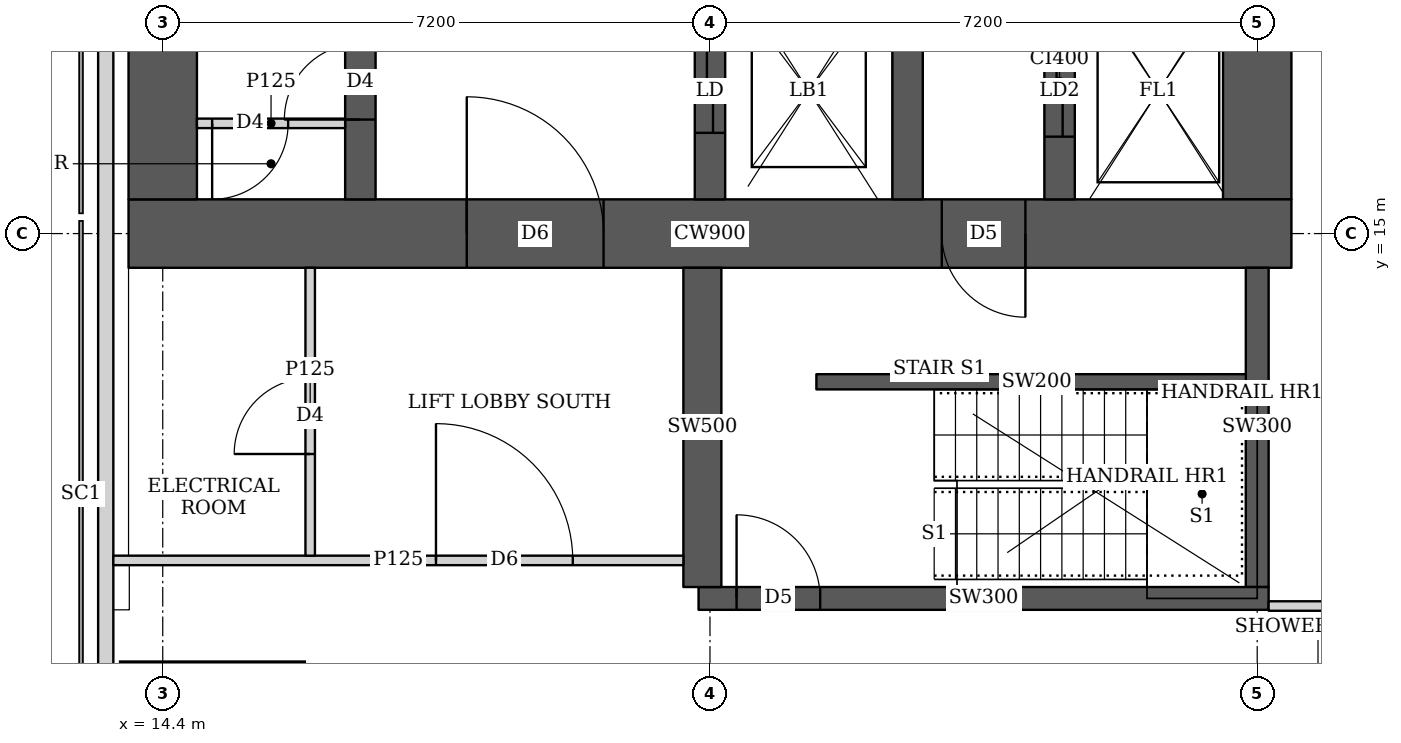
"""IFC4 building model, lengths in metres.
Left out: names, types, materials, properties, quantities, classifications, styles, units other than length and angle.
Written with IfcOpenShell. Run it as: python <this file> out.ifc"""

import sys

from ifc_helpers import new_model, si_unit, direction, frame, frame_2d, origin, origin_2d, place, context, subcontext, project, spatial, rectangle, extrude, element, fill, save


model = new_model("IFC4")
c1 = context("Model", 3, precision=1e-05, world=origin(), true_north=direction((0.0, 1.0)))
c2 = subcontext(c1, "Body", "Model", "MODEL_VIEW")
j1 = project(units=[si_unit("LENGTHUNIT", "METRE"), si_unit("PLANEANGLEUNIT", "RADIAN")], contexts=[c1])
p1 = place(None, origin())
s1 = spatial("IfcSite", under=j1, at=p1, CompositionType="ELEMENT")
p2 = place(p1, origin())
s2 = spatial("IfcBuilding", under=s1, at=p2, CompositionType="ELEMENT")
p3 = place(p2, frame((0.0, 0.0, 242.45)))
s3 = spatial("IfcBuildingStorey", under=s2, at=p3, CompositionType="ELEMENT", Elevation=242.45)
p4 = place(p3, frame((15.054, 8.154, 0.0), z_axis=(0.0, 0.0, 1.0), x_axis=(1.0, 0.0, 0.0)))
e1 = element("IfcColumn", 1, at=p4, inside=s3, PredefinedType="COLUMN", context=c2, shape_type="SweptSolid", body=[
    extrude(rectangle(XDim=2.4, YDim=2.4, at=origin_2d()), origin(), (0.0, 0.0, 1.0), 3.75),
])
p5 = place(p3, frame((13.95, 15.0, 0.0), z_axis=(0.0, 0.0, 1.0), x_axis=(1.0, 0.0, 0.0)))
e2 = element("IfcWall", 2, at=p5, inside=s3, PredefinedType="SHEAR", context=c2, shape_type="SweptSolid", body=[
    extrude(rectangle(XDim=15.3, YDim=0.9, at=frame_2d((7.65, 0.0))), origin(), (0.0, 0.0, 1.0), 3.75),
])
p6 = place(p5, frame((4.45, 0.0, 0.0)))
e3 = element("IfcOpeningElement", 3, at=p6, cuts=e2, PredefinedType="OPENING", context=c2, shape_type="SweptSolid", body=[
    extrude(rectangle(XDim=1.8, YDim=2.1, at=frame_2d((0.9, 1.05))), frame((0.0, 0.46, 0.0), z_axis=(0.0, -1.0, 0.0), x_axis=(1.0, 0.0, 0.0)), (0.0, 0.0, 1.0), 0.92),
])
p7 = place(p5, frame((10.7, 0.0, 0.0)))
e4 = element("IfcOpeningElement", 4, at=p7, cuts=e2, PredefinedType="OPENING", context=c2, shape_type="SweptSolid", body=[
    extrude(rectangle(XDim=1.1, YDim=2.1, at=frame_2d((0.55, 1.05))), frame((0.0, 0.46, 0.0), z_axis=(0.0, -1.0, 0.0), x_axis=(1.0, 0.0, 0.0)), (0.0, 0.0, 1.0), 0.92),
])
for number, where, z_axis, x_axis in (
    (5, (14.4, 15.45, 0.0), (0.0, 0.0, 1.0), (0.0, 1.0, 0.0)),
    (6, (28.8, 15.45, 0.0), (0.0, 0.0, 1.0), (0.0, 1.0, 0.0)),
):
    element("IfcWall", number, at=place(p3, frame(where, z_axis=z_axis, x_axis=x_axis)), inside=s3, PredefinedType="SHEAR", context=c2, shape_type="SweptSolid", body=[
        extrude(rectangle(XDim=14.1, YDim=0.9, at=frame_2d((7.05, 0.0))), origin(), (0.0, 0.0, 1.0), 3.75),
    ])
p8 = place(p3, frame((17.0, 15.45, 0.0), z_axis=(0.0, 0.0, 1.0), x_axis=(0.0, 1.0, 0.0)))
e7 = element("IfcWall", 7, at=p8, inside=s3, PredefinedType="SHEAR", context=c2, shape_type="SweptSolid", body=[
    extrude(rectangle(XDim=14.1, YDim=0.4, at=frame_2d((7.05, 0.0))), origin(), (0.0, 0.0, 1.0), 3.75),
])
p9 = place(p8, frame((1.05, 0.0, 0.0)))
e8 = element("IfcOpeningElement", 8, at=p9, cuts=e7, PredefinedType="OPENING", context=c2, shape_type="SweptSolid", body=[
    extrude(rectangle(XDim=1.0, YDim=2.1, at=frame_2d((0.5, 1.05))), frame((0.0, 0.21, 0.0), z_axis=(0.0, -1.0, 0.0), x_axis=(1.0, 0.0, 0.0)), (0.0, 0.0, 1.0), 0.42),
])
p10 = place(p8, frame((4.675, 0.0, 0.0)))
e9 = element("IfcOpeningElement", 9, at=p10, cuts=e7, PredefinedType="OPENING", context=c2, shape_type="SweptSolid", body=[
    extrude(rectangle(XDim=1.0, YDim=2.1, at=frame_2d((0.5, 1.05))), frame((0.0, 0.21, 0.0), z_axis=(0.0, -1.0, 0.0), x_axis=(1.0, 0.0, 0.0)), (0.0, 0.0, 1.0), 0.42),
])
p11 = place(p8, frame((8.425, 0.0, 0.0)))
e10 = element("IfcOpeningElement", 10, at=p11, cuts=e7, PredefinedType="OPENING", context=c2, shape_type="SweptSolid", body=[
    extrude(rectangle(XDim=1.0, YDim=2.1, at=frame_2d((0.5, 1.05))), frame((0.0, 0.21, 0.0), z_axis=(0.0, -1.0, 0.0), x_axis=(1.0, 0.0, 0.0)), (0.0, 0.0, 1.0), 0.42),
])
p12 = place(p8, frame((12.175, 0.0, 0.0)))
e11 = element("IfcOpeningElement", 11, at=p12, cuts=e7, PredefinedType="OPENING", context=c2, shape_type="SweptSolid", body=[
    extrude(rectangle(XDim=1.0, YDim=2.1, at=frame_2d((0.5, 1.05))), frame((0.0, 0.21, 0.0), z_axis=(0.0, -1.0, 0.0), x_axis=(1.0, 0.0, 0.0)), (0.0, 0.0, 1.0), 0.42),
])
p13 = place(p3, frame((21.6, 15.45, 0.0), z_axis=(0.0, 0.0, 1.0), x_axis=(0.0, 1.0, 0.0)))
e12 = element("IfcWall", 12, at=p13, inside=s3, PredefinedType="SHEAR", context=c2, shape_type="SweptSolid", body=[
    extrude(rectangle(XDim=14.1, YDim=0.4, at=frame_2d((7.05, 0.0))), origin(), (0.0, 0.0, 1.0), 3.75),
])
p14 = place(p13, frame((0.875, 0.0, 0.0)))
e13 = element("IfcOpeningElement", 13, at=p14, cuts=e12, PredefinedType="OPENING", context=c2, shape_type="SweptSolid", body=[
    extrude(rectangle(XDim=1.1, YDim=2.1, at=frame_2d((0.55, 1.05))), frame((0.0, 0.21, 0.0), z_axis=(0.0, -1.0, 0.0), x_axis=(1.0, 0.0, 0.0)), (0.0, 0.0, 1.0), 0.42),
])
p15 = place(p13, frame((4.625, 0.0, 0.0)))
e14 = element("IfcOpeningElement", 14, at=p15, cuts=e12, PredefinedType="OPENING", context=c2, shape_type="SweptSolid", body=[
    extrude(rectangle(XDim=1.1, YDim=2.1, at=frame_2d((0.55, 1.05))), frame((0.0, 0.21, 0.0), z_axis=(0.0, -1.0, 0.0), x_axis=(1.0, 0.0, 0.0)), (0.0, 0.0, 1.0), 0.42),
])
p16 = place(p13, frame((8.375, 0.0, 0.0)))
e15 = element("IfcOpeningElement", 15, at=p16, cuts=e12, PredefinedType="OPENING", context=c2, shape_type="SweptSolid", body=[
    extrude(rectangle(XDim=1.1, YDim=2.1, at=frame_2d((0.55, 1.05))), frame((0.0, 0.21, 0.0), z_axis=(0.0, -1.0, 0.0), x_axis=(1.0, 0.0, 0.0)), (0.0, 0.0, 1.0), 0.42),
])
p17 = place(p13, frame((12.125, 0.0, 0.0)))
e16 = element("IfcOpeningElement", 16, at=p17, cuts=e12, PredefinedType="OPENING", context=c2, shape_type="SweptSolid", body=[
    extrude(rectangle(XDim=1.1, YDim=2.1, at=frame_2d((0.55, 1.05))), frame((0.0, 0.21, 0.0), z_axis=(0.0, -1.0, 0.0), x_axis=(1.0, 0.0, 0.0)), (0.0, 0.0, 1.0), 0.42),
])
p18 = place(p3, frame((24.2, 15.45, 0.0), z_axis=(0.0, 0.0, 1.0), x_axis=(0.0, 1.0, 0.0)))
e17 = element("IfcWall", 17, at=p18, inside=s3, PredefinedType="SHEAR", context=c2, shape_type="SweptSolid", body=[
    extrude(rectangle(XDim=14.1, YDim=0.4, at=frame_2d((7.05, 0.0))), origin(), (0.0, 0.0, 1.0), 3.75),
])
p19 = place(p3, frame((26.2, 15.45, 0.0), z_axis=(0.0, 0.0, 1.0), x_axis=(0.0, 1.0, 0.0)))
e18 = element("IfcWall", 18, at=p19, inside=s3, PredefinedType="SHEAR", context=c2, shape_type="SweptSolid", body=[
    extrude(rectangle(XDim=3.1, YDim=0.4, at=frame_2d((1.55, 0.0))), origin(), (0.0, 0.0, 1.0), 3.75),
])
p20 = place(p19, frame((0.825, 0.0, 0.0)))
e19 = element("IfcOpeningElement", 19, at=p20, cuts=e18, PredefinedType="OPENING", context=c2, shape_type="SweptSolid", body=[
    extrude(rectangle(XDim=1.2, YDim=2.1, at=frame_2d((0.6, 1.05))), frame((0.0, 0.21, 0.0), z_axis=(0.0, -1.0, 0.0), x_axis=(1.0, 0.0, 0.0)), (0.0, 0.0, 1.0), 0.42),
])
p21 = place(p3, frame((21.45, 10.2, 0.0), z_axis=(0.0, 0.0, 1.0), x_axis=(1.0, 0.0, 0.0)))
e20 = element("IfcWall", 20, at=p21, inside=s3, PredefinedType="SHEAR", context=c2, shape_type="SweptSolid", body=[
    extrude(rectangle(XDim=7.5, YDim=0.3, at=frame_2d((3.75, 0.0))), origin(), (0.0, 0.0, 1.0), 3.75),
])
p22 = place(p21, frame((0.5, 0.0, 0.0)))
e21 = element("IfcOpeningElement", 21, at=p22, cuts=e20, PredefinedType="OPENING", context=c2, shape_type="SweptSolid", body=[
    extrude(rectangle(XDim=1.1, YDim=2.1, at=frame_2d((0.55, 1.05))), frame((0.0, 0.16, 0.0), z_axis=(0.0, -1.0, 0.0), x_axis=(1.0, 0.0, 0.0)), (0.0, 0.0, 1.0), 0.32),
])
p23 = place(p3, frame((21.5, 10.35, 0.0), z_axis=(0.0, 0.0, 1.0), x_axis=(0.0, 1.0, 0.0)))
e22 = element("IfcWall", 22, at=p23, inside=s3, PredefinedType="SHEAR", context=c2, shape_type="SweptSolid", body=[
    extrude(rectangle(XDim=4.2, YDim=0.5, at=frame_2d((2.1, 0.0))), origin(), (0.0, 0.0, 1.0), 3.75),
])
p24 = place(p3, frame((28.8, 10.35, 0.0), z_axis=(0.0, 0.0, 1.0), x_axis=(0.0, 1.0, 0.0)))
e23 = element("IfcWall", 23, at=p24, inside=s3, PredefinedType="SHEAR", context=c2, shape_type="SweptSolid", body=[
    extrude(rectangle(XDim=4.2, YDim=0.3, at=frame_2d((2.1, 0.0))), origin(), (0.0, 0.0, 1.0), 3.75),
])
p25 = place(p3, frame((13.65, 44.837, 0.0), z_axis=(0.0, 0.0, 1.0), x_axis=(0.0, -1.0, 0.0)))
e24 = element("IfcWall", 24, at=p25, inside=s3, PredefinedType="SOLIDWALL", context=c2, shape_type="SweptSolid", body=[
    extrude(rectangle(XDim=44.674, YDim=0.2, at=frame_2d((22.337, 0.0))), origin(), (0.0, 0.0, 1.0), 3.45),
])
p26 = place(p25, frame((1.889, 0.0, 0.9)))
e25 = element("IfcOpeningElement", 25, at=p26, cuts=e24, PredefinedType="OPENING", context=c2, shape_type="SweptSolid", body=[
    extrude(rectangle(XDim=2.4, YDim=1.5, at=frame_2d((1.2, 0.75))), frame((0.0, 0.11, 0.0), z_axis=(0.0, -1.0, 0.0), x_axis=(1.0, 0.0, 0.0)), (0.0, 0.0, 1.0), 0.22),
])
p27 = place(p25, frame((40.385, 0.0, 0.9)))
e26 = element("IfcOpeningElement", 26, at=p27, cuts=e24, PredefinedType="OPENING", context=c2, shape_type="SweptSolid", body=[
    extrude(rectangle(XDim=2.4, YDim=1.5, at=frame_2d((1.2, 0.75))), frame((0.0, 0.11, 0.0), z_axis=(0.0, -1.0, 0.0), x_axis=(1.0, 0.0, 0.0)), (0.0, 0.0, 1.0), 0.22),
])
p28 = place(p3, frame((13.75, 10.7, 0.0), z_axis=(0.0, 0.0, 1.0), x_axis=(1.0, 0.0, 0.0)))
e27 = element("IfcWall", 27, at=p28, inside=s3, PredefinedType="PARTITIONING", context=c2, shape_type="SweptSolid", body=[
    extrude(rectangle(XDim=7.5, YDim=0.125, at=frame_2d((3.75, 0.0))), origin(), (0.0, 0.0, 1.0), 3.45),
])
p29 = place(p28, frame((4.245, 0.0, 0.0)))
e28 = element("IfcOpeningElement", 28, at=p29, cuts=e27, PredefinedType="OPENING", context=c2, shape_type="SweptSolid", body=[
    extrude(rectangle(XDim=1.8, YDim=2.1, at=frame_2d((0.9, 1.05))), frame((0.0, 0.073, 0.0), z_axis=(0.0, -1.0, 0.0), x_axis=(1.0, 0.0, 0.0)), (0.0, 0.0, 1.0), 0.145),
])
p30 = place(p3, frame((16.34, 10.762, 0.0), z_axis=(0.0, 0.0, 1.0), x_axis=(0.0, 1.0, 0.0)))
e29 = element("IfcWall", 29, at=p30, inside=s3, PredefinedType="PARTITIONING", context=c2, shape_type="SweptSolid", body=[
    extrude(rectangle(XDim=3.788, YDim=0.125, at=frame_2d((1.894, 0.0))), origin(), (0.0, 0.0, 1.0), 3.45),
])
p31 = place(p30, frame((1.338, 0.0, 0.0)))
e30 = element("IfcOpeningElement", 30, at=p31, cuts=e29, PredefinedType="OPENING", context=c2, shape_type="SweptSolid", body=[
    extrude(rectangle(XDim=1.0, YDim=2.1, at=frame_2d((0.5, 1.05))), frame((0.0, 0.073, 0.0), z_axis=(0.0, -1.0, 0.0), x_axis=(1.0, 0.0, 0.0)), (0.0, 0.0, 1.0), 0.145),
])
p32 = place(p3, frame((28.95, 10.1, 0.0), z_axis=(0.0, 0.0, 1.0), x_axis=(1.0, 0.0, 0.0)))
e31 = element("IfcWall", 31, at=p32, inside=s3, PredefinedType="PARTITIONING", context=c2, shape_type="SweptSolid", body=[
    extrude(rectangle(XDim=9.188, YDim=0.125, at=frame_2d((4.594, 0.0))), origin(), (0.0, 0.0, 1.0), 3.45),
])
p33 = place(p3, frame((14.85, 16.45, 0.0), z_axis=(0.0, 0.0, 1.0), x_axis=(1.0, 0.0, 0.0)))
e32 = element("IfcWall", 32, at=p33, inside=s3, PredefinedType="PARTITIONING", context=c2, shape_type="SweptSolid", body=[
    extrude(rectangle(XDim=1.95, YDim=0.125, at=frame_2d((0.975, 0.0))), origin(), (0.0, 0.0, 1.0), 3.45),
])
p34 = place(p33, frame((0.2, 0.0, 0.0)))
e33 = element("IfcOpeningElement", 33, at=p34, cuts=e32, PredefinedType="OPENING", context=c2, shape_type="SweptSolid", body=[
    extrude(rectangle(XDim=1.0, YDim=2.1, at=frame_2d((0.5, 1.05))), frame((0.0, 0.073, 0.0), z_axis=(0.0, -1.0, 0.0), x_axis=(1.0, 0.0, 0.0)), (0.0, 0.0, 1.0), 0.145),
])
p35 = place(p3, frame((23.0, 13.05, 0.0), z_axis=(0.0, 0.0, 1.0), x_axis=(1.0, 0.0, 0.0)))
e34 = element("IfcWall", 34, at=p35, inside=s3, PredefinedType="SHEAR", context=c2, shape_type="SweptSolid", body=[
    extrude(rectangle(XDim=5.8, YDim=0.2, at=frame_2d((2.9, 0.0))), origin(), (0.0, 0.0, 1.0), 3.75),
])
p36 = place(p31, origin())
e35 = element("IfcDoor", 35, at=p36, inside=s3, OperationType="SINGLE_SWING_LEFT", PredefinedType="DOOR", context=c2, shape_type="SweptSolid", body=[
    extrude(rectangle(XDim=1.0, YDim=2.1, at=frame_2d((0.5, 1.05))), frame((0.0, 0.025, 0.0), z_axis=(0.0, -1.0, 0.0), x_axis=(1.0, 0.0, 0.0)), (0.0, 0.0, 1.0), 0.05),
])
fill(e30, e35)
p37 = place(p29, origin())
e36 = element("IfcDoor", 36, at=p37, inside=s3, OperationType="DOUBLE_DOOR_SINGLE_SWING", PredefinedType="DOOR", context=c2, shape_type="SweptSolid", body=[
    extrude(rectangle(XDim=1.8, YDim=2.1, at=frame_2d((0.9, 1.05))), frame((0.0, 0.025, 0.0), z_axis=(0.0, -1.0, 0.0), x_axis=(1.0, 0.0, 0.0)), (0.0, 0.0, 1.0), 0.05),
])
fill(e28, e36)
p38 = place(p34, origin())
e37 = element("IfcDoor", 37, at=p38, inside=s3, OperationType="SINGLE_SWING_RIGHT", PredefinedType="DOOR", context=c2, shape_type="SweptSolid", body=[
    extrude(rectangle(XDim=1.0, YDim=2.1, at=frame_2d((0.5, 1.05))), frame((0.0, 0.025, 0.0), z_axis=(0.0, -1.0, 0.0), x_axis=(1.0, 0.0, 0.0)), (0.0, 0.0, 1.0), 0.05),
])
fill(e33, e37)
p39 = place(p9, origin())
e38 = element("IfcDoor", 38, at=p39, inside=s3, OperationType="SINGLE_SWING_LEFT", PredefinedType="DOOR", context=c2, shape_type="SweptSolid", body=[
    extrude(rectangle(XDim=1.0, YDim=2.1, at=frame_2d((0.5, 1.05))), frame((0.0, 0.025, 0.0), z_axis=(0.0, -1.0, 0.0), x_axis=(1.0, 0.0, 0.0)), (0.0, 0.0, 1.0), 0.05),
])
fill(e8, e38)
p40 = place(p6, origin())
e39 = element("IfcDoor", 39, at=p40, inside=s3, OperationType="DOUBLE_DOOR_SINGLE_SWING", PredefinedType="DOOR", context=c2, shape_type="SweptSolid", body=[
    extrude(rectangle(XDim=1.8, YDim=2.1, at=frame_2d((0.9, 1.05))), frame((0.0, 0.025, 0.0), z_axis=(0.0, -1.0, 0.0), x_axis=(1.0, 0.0, 0.0)), (0.0, 0.0, 1.0), 0.05),
])
fill(e3, e39)
p41 = place(p7, origin())
e40 = element("IfcDoor", 40, at=p41, inside=s3, OperationType="SINGLE_SWING_LEFT", PredefinedType="DOOR", context=c2, shape_type="SweptSolid", body=[
    extrude(rectangle(XDim=1.1, YDim=2.1, at=frame_2d((0.55, 1.05))), frame((0.0, 0.025, 0.0), z_axis=(0.0, -1.0, 0.0), x_axis=(1.0, 0.0, 0.0)), (0.0, 0.0, 1.0), 0.05),
])
fill(e4, e40)
p42 = place(p20, origin())
e41 = element("IfcDoor", 41, at=p42, inside=s3, OperationType="DOUBLE_DOOR_SLIDING", PredefinedType="DOOR", context=c2, shape_type="SweptSolid", body=[
    extrude(rectangle(XDim=1.2, YDim=2.1, at=frame_2d((0.6, 1.05))), frame((0.0, 0.025, 0.0), z_axis=(0.0, -1.0, 0.0), x_axis=(1.0, 0.0, 0.0)), (0.0, 0.0, 1.0), 0.05),
])
fill(e19, e41)
p43 = place(p14, origin())
e42 = element("IfcDoor", 42, at=p43, inside=s3, OperationType="DOUBLE_DOOR_SLIDING", PredefinedType="DOOR", context=c2, shape_type="SweptSolid", body=[
    extrude(rectangle(XDim=1.1, YDim=2.1, at=frame_2d((0.55, 1.05))), frame((0.0, 0.025, 0.0), z_axis=(0.0, -1.0, 0.0), x_axis=(1.0, 0.0, 0.0)), (0.0, 0.0, 1.0), 0.05),
])
fill(e13, e42)
p44 = place(p22, origin())
e43 = element("IfcDoor", 43, at=p44, inside=s3, OperationType="SINGLE_SWING_LEFT", PredefinedType="DOOR", context=c2, shape_type="SweptSolid", body=[
    extrude(rectangle(XDim=1.1, YDim=2.1, at=frame_2d((0.55, 1.05))), frame((0.0, 0.025, 0.0), z_axis=(0.0, -1.0, 0.0), x_axis=(1.0, 0.0, 0.0)), (0.0, 0.0, 1.0), 0.05),
])
fill(e21, e43)
save(model, sys.argv[1])
